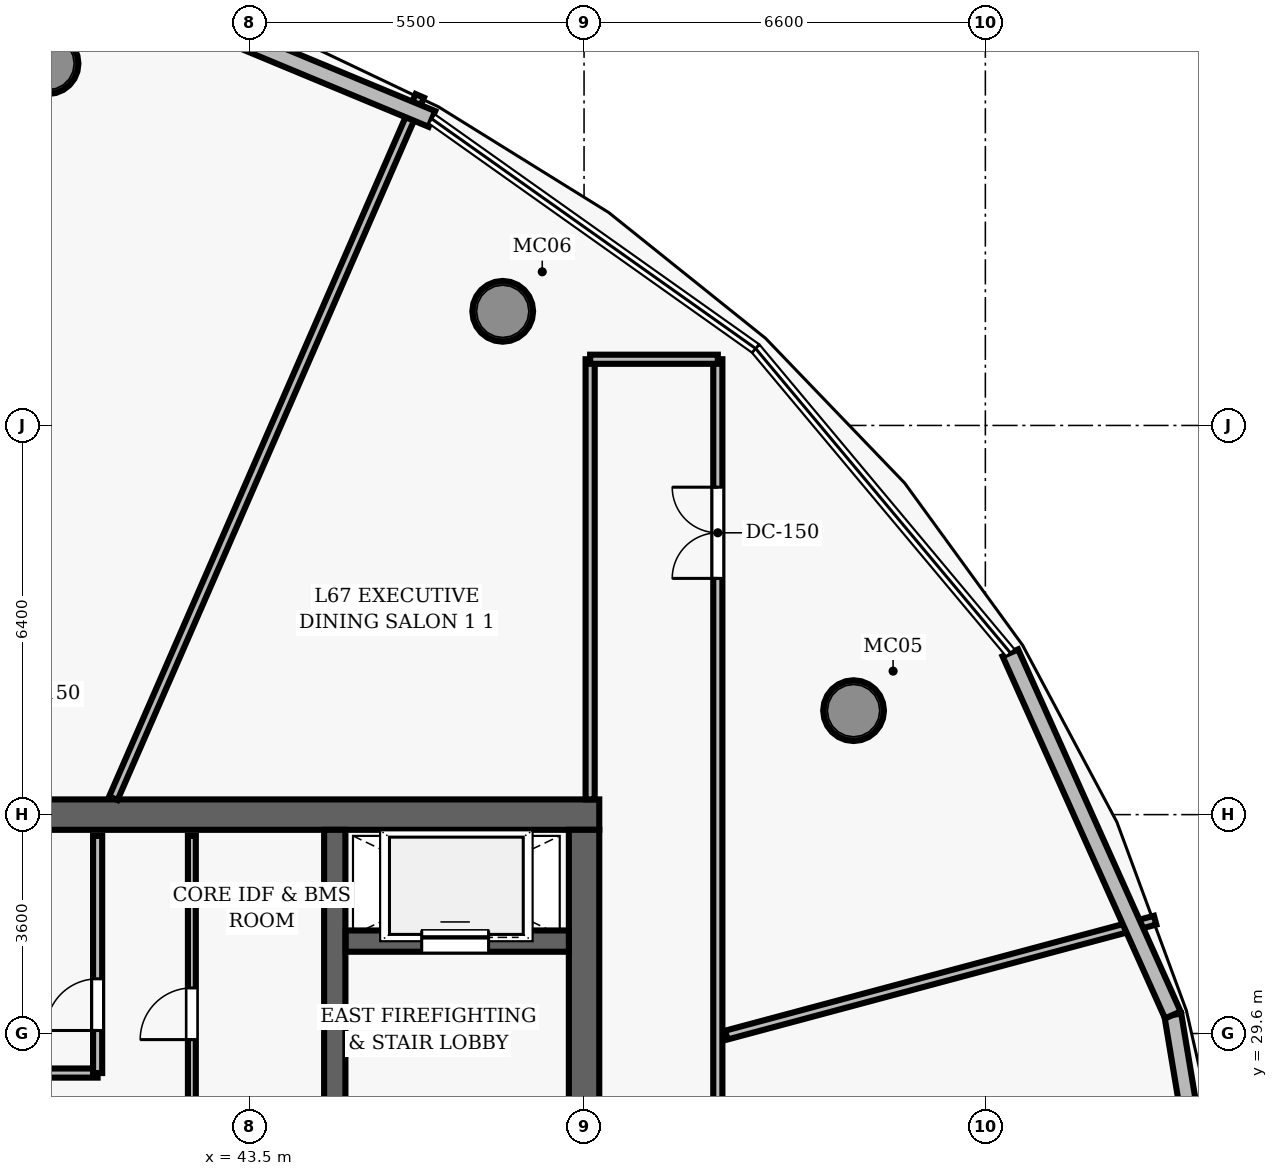
"""IFC4 building model, lengths in metres.
Left out: names, types, materials, properties, quantities, classifications, styles, units other than length and angle.
Written with IfcOpenShell. Run it as: python <this file> out.ifc"""

import sys

from ifc_helpers import new_model, si_unit, direction, frame, frame_2d, origin, origin_2d, place, context, subcontext, project, spatial, rectangle, hollow_circle, extrude, element, fill, save


model = new_model("IFC4")
c1 = context("Model", 3, precision=1e-05, world=origin(), true_north=direction((0.0, 1.0)))
c2 = subcontext(c1, "Body", "Model", "MODEL_VIEW")
j1 = project(units=[si_unit("LENGTHUNIT", "METRE"), si_unit("PLANEANGLEUNIT", "RADIAN")], contexts=[c1])
p1 = place(None, origin())
s1 = spatial("IfcSite", under=j1, at=p1, CompositionType="ELEMENT")
p2 = place(p1, origin())
s2 = spatial("IfcBuilding", under=s1, at=p2, CompositionType="ELEMENT")
p3 = place(p2, frame((0.0, 0.0, 265.15)))
s3 = spatial("IfcBuildingStorey", under=s2, at=p3, CompositionType="ELEMENT", Elevation=265.15)
p4 = place(p3, frame((26.75, 33.2, 0.0), z_axis=(0.0, 0.0, 1.0), x_axis=(1.0, 0.0, 0.0)))
e1 = element("IfcWall", 1, at=p4, inside=s3, PredefinedType="SHEAR", context=c2, shape_type="SweptSolid", body=[
    extrude(rectangle(XDim=22.5, YDim=0.5, at=frame_2d((11.25, 0.0))), origin(), (0.0, 0.0, 1.0), 3.85),
])
p5 = place(p3, frame((49.0, 19.05, 0.0), z_axis=(0.0, 0.0, 1.0), x_axis=(0.0, 1.0, 0.0)))
e2 = element("IfcWall", 2, at=p5, inside=s3, PredefinedType="SHEAR", context=c2, shape_type="SweptSolid", body=[
    extrude(rectangle(XDim=13.9, YDim=0.5, at=frame_2d((6.95, 0.0))), origin(), (0.0, 0.0, 1.0), 3.85),
])
p6 = place(p5, frame((8.2, 0.0, 0.0)))
e3 = element("IfcOpeningElement", 3, at=p6, cuts=e2, PredefinedType="OPENING", context=c2, shape_type="SweptSolid", body=[
    extrude(rectangle(XDim=1.05, YDim=2.15, at=frame_2d((0.525, 1.075))), frame((0.0, 0.26, 0.0), z_axis=(0.0, -1.0, 0.0), x_axis=(1.0, 0.0, 0.0)), (0.0, 0.0, 1.0), 0.52),
])
p7 = place(p3, frame((44.9, 19.05, 0.0), z_axis=(0.0, 0.0, 1.0), x_axis=(0.0, 1.0, 0.0)))
e4 = element("IfcWall", 4, at=p7, inside=s3, PredefinedType="SHEAR", context=c2, shape_type="SweptSolid", body=[
    extrude(rectangle(XDim=13.9, YDim=0.35, at=frame_2d((6.95, 0.0))), origin(), (0.0, 0.0, 1.0), 3.85),
])
for number, where, z_axis, x_axis in (
    (5, (53.433, 34.91, 0.0), (0.0, 0.0, 1.0), (1.0, 0.0, 0.0)),
    (6, (47.662, 41.477, 0.0), (0.0, 0.0, 1.0), (1.0, 0.0, 0.0)),
    (7, (40.185, 45.551, 0.0), (0.0, 0.0, 1.0), (1.0, 0.0, 0.0)),
):
    element("IfcColumn", number, at=place(p3, frame(where, z_axis=z_axis, x_axis=x_axis)), inside=s3, PredefinedType="COLUMN", context=c2, shape_type="SweptSolid", body=[
        extrude(hollow_circle(Radius=0.5, WallThickness=0.045, at=origin_2d()), origin(), (0.0, 0.0, 1.0), 3.85),
    ])
p8 = place(p3, frame((45.08, 31.12, 0.0), z_axis=(0.0, 0.0, 1.0), x_axis=(1.0, 0.0, 0.0)))
e8 = element("IfcWall", 8, at=p8, inside=s3, PredefinedType="SHEAR", context=c2, shape_type="SweptSolid", body=[
    extrude(rectangle(XDim=3.67, YDim=0.35, at=frame_2d((1.835, 0.0))), origin(), (0.0, 0.0, 1.0), 3.04),
])
p9 = place(p8, frame((1.25, 0.0, 0.0)))
e9 = element("IfcOpeningElement", 9, at=p9, cuts=e8, PredefinedType="OPENING", context=c2, shape_type="SweptSolid", body=[
    extrude(rectangle(XDim=1.1, YDim=2.15, at=frame_2d((0.55, 1.075))), frame((0.0, 0.185, 0.0), z_axis=(0.0, -1.0, 0.0), x_axis=(1.0, 0.0, 0.0)), (0.0, 0.0, 1.0), 0.37),
])
p10 = place(p3, frame((34.64, 28.95, 0.0), z_axis=(0.0, 0.0, 1.0), x_axis=(1.0, 0.0, 0.0)))
e10 = element("IfcWall", 10, at=p10, inside=s3, PredefinedType="PARTITIONING", context=c2, shape_type="SweptSolid", body=[
    extrude(rectangle(XDim=6.36, YDim=0.15, at=frame_2d((3.18, 0.0))), origin(), (0.0, 0.0, 1.0), 3.04),
])
p11 = place(p3, frame((41.0, 28.95, 0.0), z_axis=(0.0, 0.0, 1.0), x_axis=(0.0, 1.0, 0.0)))
e11 = element("IfcWall", 11, at=p11, inside=s3, PredefinedType="PARTITIONING", context=c2, shape_type="SweptSolid", body=[
    extrude(rectangle(XDim=3.9, YDim=0.15, at=frame_2d((1.95, 0.0))), origin(), (0.0, 0.0, 1.0), 3.04),
])
p12 = place(p11, frame((0.7, 0.0, 0.0)))
e12 = element("IfcOpeningElement", 12, at=p12, cuts=e11, PredefinedType="OPENING", context=c2, shape_type="SweptSolid", body=[
    extrude(rectangle(XDim=0.85, YDim=2.1, at=frame_2d((0.425, 1.05))), frame((0.0, 0.085, 0.0), z_axis=(0.0, -1.0, 0.0), x_axis=(1.0, 0.0, 0.0)), (0.0, 0.0, 1.0), 0.17),
])
p13 = place(p3, frame((42.55, 28.1, 0.0), z_axis=(0.0, 0.0, 1.0), x_axis=(0.0, 1.0, 0.0)))
e13 = element("IfcWall", 13, at=p13, inside=s3, PredefinedType="PARTITIONING", context=c2, shape_type="SweptSolid", body=[
    extrude(rectangle(XDim=4.75, YDim=0.13, at=frame_2d((2.375, 0.0))), origin(), (0.0, 0.0, 1.0), 3.04),
])
p14 = place(p13, frame((1.4, 0.0, 0.0)))
e14 = element("IfcOpeningElement", 14, at=p14, cuts=e13, PredefinedType="OPENING", context=c2, shape_type="SweptSolid", body=[
    extrude(rectangle(XDim=0.85, YDim=2.1, at=frame_2d((0.425, 1.05))), frame((0.0, 0.075, 0.0), z_axis=(0.0, -1.0, 0.0), x_axis=(1.0, 0.0, 0.0)), (0.0, 0.0, 1.0), 0.15),
])
p15 = place(p3, frame((51.2, 10.6, 0.0), z_axis=(0.0, 0.0, 1.0), x_axis=(0.0, 1.0, 0.0)))
e15 = element("IfcWall", 15, at=p15, inside=s3, PredefinedType="PARTITIONING", context=c2, shape_type="SweptSolid", body=[
    extrude(rectangle(XDim=30.089, YDim=0.15, at=frame_2d((15.044, 0.0))), origin(), (0.0, 0.0, 1.0), 3.04),
])
p16 = place(p15, frame((26.485, 0.0, 0.0)))
e16 = element("IfcOpeningElement", 16, at=p16, cuts=e15, PredefinedType="OPENING", context=c2, shape_type="SweptSolid", body=[
    extrude(rectangle(XDim=1.5, YDim=2.2, at=frame_2d((0.75, 1.1))), frame((0.0, 0.085, 0.0), z_axis=(0.0, -1.0, 0.0), x_axis=(1.0, 0.0, 0.0)), (0.0, 0.0, 1.0), 0.17),
])
p17 = place(p15, frame((15.289, 0.0, 0.0)))
e17 = element("IfcOpeningElement", 17, at=p17, cuts=e15, PredefinedType="OPENING", context=c2, shape_type="SweptSolid", body=[
    extrude(rectangle(XDim=0.95, YDim=2.15, at=frame_2d((0.475, 1.075))), frame((0.0, 0.085, 0.0), z_axis=(0.0, -1.0, 0.0), x_axis=(1.0, 0.0, 0.0)), (0.0, 0.0, 1.0), 0.17),
])
p18 = place(p3, frame((49.1, 33.45, 0.0), z_axis=(0.0, 0.0, 1.0), x_axis=(0.0, 1.0, 0.0)))
e18 = element("IfcWall", 18, at=p18, inside=s3, PredefinedType="PARTITIONING", context=c2, shape_type="SweptSolid", body=[
    extrude(rectangle(XDim=7.239, YDim=0.15, at=frame_2d((3.619, 0.0))), origin(), (0.0, 0.0, 1.0), 3.04),
])
p19 = place(p3, frame((49.1, 40.689, 0.0), z_axis=(0.0, 0.0, 1.0), x_axis=(1.0, 0.0, 0.0)))
e19 = element("IfcWall", 19, at=p19, inside=s3, PredefinedType="PARTITIONING", context=c2, shape_type="SweptSolid", body=[
    extrude(rectangle(XDim=2.1, YDim=0.15, at=frame_2d((1.05, 0.0))), origin(), (0.0, 0.0, 1.0), 3.04),
])
p20 = place(p3, frame((51.34, 29.574, 0.0), z_axis=(0.0, 0.0, 1.0), x_axis=(0.965925662207, 0.258819657463, 0.0)))
e20 = element("IfcWall", 20, at=p20, inside=s3, PredefinedType="PARTITIONING", context=c2, shape_type="SweptSolid", body=[
    extrude(rectangle(XDim=7.301, YDim=0.15, at=frame_2d((3.65, 0.0))), origin(), (0.0, 0.0, 1.0), 3.04),
])
p21 = place(p3, frame((41.259, 33.47, 0.0), z_axis=(0.0, 0.0, 1.0), x_axis=(0.399905988598, 0.916556163191, 0.0)))
e21 = element("IfcWall", 21, at=p21, inside=s3, PredefinedType="PARTITIONING", context=c2, shape_type="SweptSolid", body=[
    extrude(rectangle(XDim=12.602, YDim=0.15, at=frame_2d((6.301, 0.0))), origin(), (0.0, 0.0, 1.0), 3.04),
])
p22 = place(p3, frame((58.683, 29.906, 0.0), z_axis=(0.0, 0.0, 1.0), x_axis=(0.164077460274, -0.986447457815, 0.0)))
e22 = element("IfcWall", 22, at=p22, inside=s3, PredefinedType="SOLIDWALL", context=c2, shape_type="SweptSolid", body=[
    extrude(rectangle(XDim=6.526, YDim=0.28, at=frame_2d((3.263, 0.0))), origin(), (0.0, 0.0, 1.0), 3.625),
])
p23 = place(p3, frame((56.011, 35.861, 0.0), z_axis=(0.0, 0.0, 1.0), x_axis=(0.409401707674, -0.912354230414, 0.0)))
e23 = element("IfcWall", 23, at=p23, inside=s3, PredefinedType="SOLIDWALL", context=c2, shape_type="SweptSolid", body=[
    extrude(rectangle(XDim=6.527, YDim=0.28, at=frame_2d((3.263, 0.0))), origin(), (0.0, 0.0, 1.0), 3.625),
])
p24 = place(p3, frame((40.639, 47.076, 0.0), z_axis=(0.0, 0.0, 1.0), x_axis=(0.92339875501, -0.383842075919, 0.0)))
e24 = element("IfcWall", 24, at=p24, inside=s3, PredefinedType="SOLIDWALL", context=c2, shape_type="SweptSolid", body=[
    extrude(rectangle(XDim=6.345, YDim=0.28, at=frame_2d((3.173, 0.0))), origin(), (0.0, 0.0, 1.0), 3.625),
])
p25 = place(p12, origin())
e25 = element("IfcDoor", 25, at=p25, inside=s3, OperationType="SINGLE_SWING_LEFT", PredefinedType="DOOR", context=c2, shape_type="SweptSolid", body=[
    extrude(rectangle(XDim=0.85, YDim=2.1, at=frame_2d((0.425, 1.05))), frame((0.0, 0.025, 0.0), z_axis=(0.0, -1.0, 0.0), x_axis=(1.0, 0.0, 0.0)), (0.0, 0.0, 1.0), 0.05),
])
fill(e12, e25)
p26 = place(p14, origin())
e26 = element("IfcDoor", 26, at=p26, inside=s3, OperationType="SINGLE_SWING_LEFT", PredefinedType="DOOR", context=c2, shape_type="SweptSolid", body=[
    extrude(rectangle(XDim=0.85, YDim=2.1, at=frame_2d((0.425, 1.05))), frame((0.0, 0.025, 0.0), z_axis=(0.0, -1.0, 0.0), x_axis=(1.0, 0.0, 0.0)), (0.0, 0.0, 1.0), 0.05),
])
fill(e14, e26)
p27 = place(p16, origin())
e27 = element("IfcDoor", 27, at=p27, inside=s3, OperationType="DOUBLE_DOOR_SINGLE_SWING", PredefinedType="DOOR", context=c2, shape_type="SweptSolid", body=[
    extrude(rectangle(XDim=1.5, YDim=2.2, at=frame_2d((0.75, 1.1))), frame((0.0, 0.025, 0.0), z_axis=(0.0, -1.0, 0.0), x_axis=(1.0, 0.0, 0.0)), (0.0, 0.0, 1.0), 0.05),
])
fill(e16, e27)
p28 = place(p9, origin())
e28 = element("IfcDoor", 28, at=p28, inside=s3, OperationType="SLIDING_TO_LEFT", PredefinedType="DOOR", context=c2, shape_type="SweptSolid", body=[
    extrude(rectangle(XDim=1.1, YDim=2.15, at=frame_2d((0.55, 1.075))), frame((0.0, 0.025, 0.0), z_axis=(0.0, -1.0, 0.0), x_axis=(1.0, 0.0, 0.0)), (0.0, 0.0, 1.0), 0.05),
])
fill(e9, e28)
save(model, sys.argv[1])
